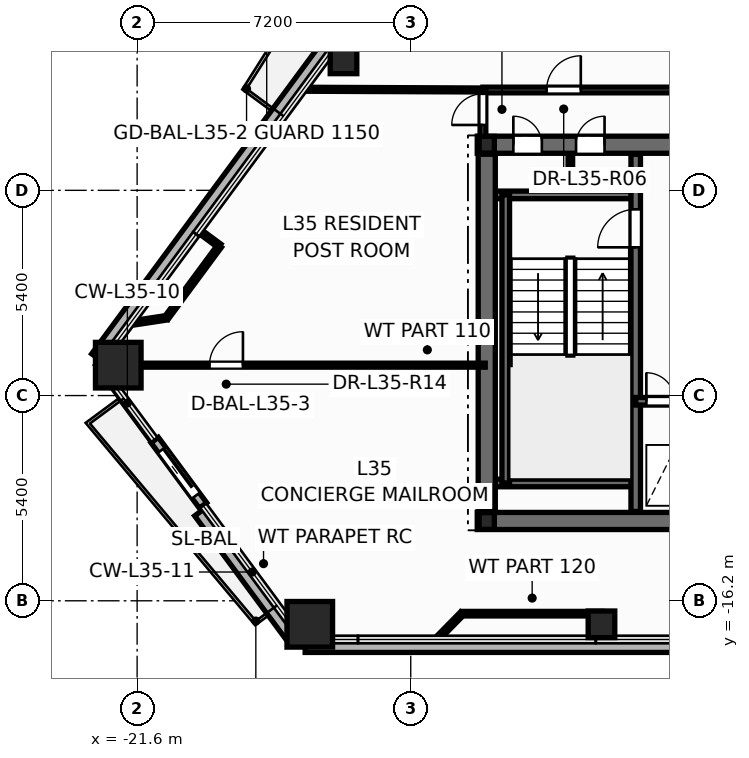
"""IFC4 building model, lengths in metres.
Left out: names, types, materials, properties, quantities, classifications, styles, units other than length and angle.
Written with IfcOpenShell. Run it as: python <this file> out.ifc"""

import sys

from ifc_helpers import new_model, si_unit, direction, frame, frame_2d, origin, origin_2d, place, context, subcontext, project, spatial, rectangle, hollow_rectangle, hollow_circle, i_section, extrude, element, fill, save


model = new_model("IFC4")
c1 = context("Model", 3, precision=1e-05, world=origin(), true_north=direction((0.0, 1.0)))
c2 = subcontext(c1, "Body", "Model", "MODEL_VIEW")
j1 = project(units=[si_unit("LENGTHUNIT", "METRE"), si_unit("PLANEANGLEUNIT", "RADIAN")], contexts=[c1])
p1 = place(None, origin())
s1 = spatial("IfcSite", under=j1, at=p1, CompositionType="ELEMENT")
p2 = place(p1, origin())
s2 = spatial("IfcBuilding", under=s1, at=p2, CompositionType="ELEMENT")
p3 = place(p2, frame((0.0, 0.0, 136.5)))
s3 = spatial("IfcBuildingStorey", under=s2, at=p3, CompositionType="ELEMENT", Elevation=136.5)
for number, where, z_axis, x_axis in (
    (1, (-22.096, -10.0, 0.0), (0.0, 0.0, 1.0), (1.0, 0.0, 0.0)),
    (2, (-17.057, -16.819, 0.0), (0.0, 0.0, 1.0), (1.0, 0.0, 0.0)),
):
    element("IfcColumn", number, at=place(p3, frame(where, z_axis=z_axis, x_axis=x_axis)), inside=s3, PredefinedType="COLUMN", context=c2, shape_type="SweptSolid", body=[
        extrude(hollow_rectangle(XDim=1.2, YDim=1.2, WallThickness=0.055, at=origin_2d()), origin(), (0.0, 0.0, 1.0), 3.6),
    ])
for number, where, z_axis, x_axis in (
    (3, (-9.381, -16.819, 0.0), (0.0, 0.0, 1.0), (1.0, 0.0, 0.0)),
    (4, (-16.169, -1.98, 0.0), (0.0, 0.0, 1.0), (1.0, 0.0, 0.0)),
):
    element("IfcColumn", number, at=place(p3, frame(where, z_axis=z_axis, x_axis=x_axis)), inside=s3, PredefinedType="COLUMN", context=c2, shape_type="SweptSolid", body=[
        extrude(hollow_circle(Radius=0.35, WallThickness=0.03, at=origin_2d()), origin(), (0.0, 0.0, 1.0), 3.6),
    ])
for number, where, z_axis, x_axis in (
    (5, (-12.4, -14.1, 0.0), (0.0, 0.0, 1.0), (1.0, 0.0, 0.0)),
    (6, (-12.4, -4.2, 0.0), (0.0, 0.0, 1.0), (1.0, 0.0, 0.0)),
):
    element("IfcColumn", number, at=place(p3, frame(where, z_axis=z_axis, x_axis=x_axis)), inside=s3, PredefinedType="COLUMN", context=c2, shape_type="SweptSolid", body=[
        extrude(i_section(OverallWidth=0.4, OverallDepth=0.44, WebThickness=0.028, FlangeThickness=0.04, at=origin_2d()), origin(), (0.0, 0.0, 1.0), 3.6),
    ])
p4 = place(p3, frame((-19.941, -13.858, -0.2), z_axis=(0.0, 0.0, 1.0), x_axis=(0.594364765999, -0.804195576299, 0.0)))
e7 = element("IfcWall", 7, at=p4, inside=s3, PredefinedType="PARAPET", context=c2, shape_type="SweptSolid", body=[
    extrude(rectangle(XDim=4.177, YDim=0.36, at=frame_2d((2.088, 0.0))), origin(), (0.0, 0.0, 1.0), 0.38),
])
p5 = place(p3, frame((-17.179, -17.379, -0.2), z_axis=(0.0, 0.0, 1.0), x_axis=(1.0, 0.0, 0.0)))
e8 = element("IfcWall", 8, at=p5, inside=s3, PredefinedType="PARAPET", context=c2, shape_type="SweptSolid", body=[
    extrude(rectangle(XDim=34.357, YDim=0.36, at=frame_2d((17.179, 0.0))), origin(), (0.0, 0.0, 1.0), 0.38),
])
p6 = place(p3, frame((-13.986, 1.915, -0.2), z_axis=(0.0, 0.0, 1.0), x_axis=(-0.594360924603, -0.804198415383, 0.0)))
e9 = element("IfcWall", 9, at=p6, inside=s3, PredefinedType="PARAPET", context=c2, shape_type="SweptSolid", body=[
    extrude(rectangle(XDim=14.578, YDim=0.36, at=frame_2d((7.289, 0.0))), origin(), (0.0, 0.0, 1.0), 0.38),
])
p7 = place(p3, frame((-21.138, -11.97, -0.015), z_axis=(0.0, 0.0, 1.0), x_axis=(0.594381437757, -0.804183254271, 0.0)))
e10 = element("IfcWall", 10, at=p7, inside=s3, PredefinedType="STANDARD", context=c2, shape_type="SweptSolid", body=[
    extrude(rectangle(XDim=2.14, YDim=0.24, at=frame_2d((1.07, 0.0))), origin(), (0.0, 0.0, 1.0), 2.807),
])
p8 = place(p7, frame((0.32, 0.0, 0.015)))
e11 = element("IfcOpeningElement", 11, at=p8, cuts=e10, PredefinedType="OPENING", context=c2, shape_type="SweptSolid", body=[
    extrude(rectangle(XDim=1.506, YDim=2.204, at=frame_2d((0.75, 1.102))), frame((0.0, 0.13, 0.0), z_axis=(0.0, -1.0, 0.0), x_axis=(1.0, 0.0, 0.0)), (0.0, 0.0, 1.0), 0.26),
])
p9 = place(p3, frame((-10.2, -5.52, 0.0), z_axis=(0.0, 0.0, 1.0), x_axis=(0.0, 1.0, 0.0)))
e12 = element("IfcWall", 12, at=p9, inside=s3, PredefinedType="PARTITIONING", context=c2, shape_type="SweptSolid", body=[
    extrude(rectangle(XDim=1.12, YDim=0.12, at=frame_2d((0.56, 0.0))), origin(), (0.0, 0.0, 1.0), 3.35),
])
p10 = place(p3, frame((-12.65, -14.1, 0.0), z_axis=(0.0, 0.0, 1.0), x_axis=(1.0, 0.0, 0.0)))
e13 = element("IfcWall", 13, at=p10, inside=s3, PredefinedType="SHEAR", context=c2, shape_type="SweptSolid", body=[
    extrude(rectangle(XDim=25.3, YDim=0.45, at=frame_2d((12.65, 0.0))), origin(), (0.0, 0.0, 1.0), 3.6),
])
p11 = place(p3, frame((-12.65, -4.2, 0.0), z_axis=(0.0, 0.0, 1.0), x_axis=(1.0, 0.0, 0.0)))
e14 = element("IfcWall", 14, at=p11, inside=s3, PredefinedType="SHEAR", context=c2, shape_type="SweptSolid", body=[
    extrude(rectangle(XDim=25.3, YDim=0.45, at=frame_2d((12.65, 0.0))), origin(), (0.0, 0.0, 1.0), 3.6),
])
p12 = place(p11, frame((0.95, 0.0, 0.0)))
e15 = element("IfcOpeningElement", 15, at=p12, cuts=e14, PredefinedType="OPENING", context=c2, shape_type="SweptSolid", body=[
    extrude(rectangle(XDim=0.756, YDim=2.054, at=frame_2d((0.375, 1.027))), frame((0.0, 0.235, 0.0), z_axis=(0.0, -1.0, 0.0), x_axis=(1.0, 0.0, 0.0)), (0.0, 0.0, 1.0), 0.47),
])
p13 = place(p11, frame((2.6, 0.0, 0.0)))
e16 = element("IfcOpeningElement", 16, at=p13, cuts=e14, PredefinedType="OPENING", context=c2, shape_type="SweptSolid", body=[
    extrude(rectangle(XDim=0.756, YDim=2.054, at=frame_2d((0.375, 1.027))), frame((0.0, 0.235, 0.0), z_axis=(0.0, -1.0, 0.0), x_axis=(1.0, 0.0, 0.0)), (0.0, 0.0, 1.0), 0.47),
])
p14 = place(p11, frame((21.85, 0.0, 0.0)))
e17 = element("IfcOpeningElement", 17, at=p14, cuts=e14, PredefinedType="OPENING", context=c2, shape_type="SweptSolid", body=[
    extrude(rectangle(XDim=0.756, YDim=2.054, at=frame_2d((0.375, 1.027))), frame((0.0, 0.235, 0.0), z_axis=(0.0, -1.0, 0.0), x_axis=(1.0, 0.0, 0.0)), (0.0, 0.0, 1.0), 0.47),
])
p15 = place(p11, frame((23.5, 0.0, 0.0)))
e18 = element("IfcOpeningElement", 18, at=p15, cuts=e14, PredefinedType="OPENING", context=c2, shape_type="SweptSolid", body=[
    extrude(rectangle(XDim=0.756, YDim=2.054, at=frame_2d((0.375, 1.027))), frame((0.0, 0.235, 0.0), z_axis=(0.0, -1.0, 0.0), x_axis=(1.0, 0.0, 0.0)), (0.0, 0.0, 1.0), 0.47),
])
p16 = place(p11, frame((5.85, 0.0, 0.0)))
e19 = element("IfcOpeningElement", 19, at=p16, cuts=e14, PredefinedType="OPENING", context=c2, shape_type="SweptSolid", body=[
    extrude(rectangle(XDim=1.006, YDim=2.104, at=frame_2d((0.5, 1.052))), frame((0.0, 0.235, 0.0), z_axis=(0.0, -1.0, 0.0), x_axis=(1.0, 0.0, 0.0)), (0.0, 0.0, 1.0), 0.47),
])
p17 = place(p11, frame((10.35, 0.0, 0.0)))
e20 = element("IfcOpeningElement", 20, at=p17, cuts=e14, PredefinedType="OPENING", context=c2, shape_type="SweptSolid", body=[
    extrude(rectangle(XDim=1.406, YDim=2.154, at=frame_2d((0.7, 1.077))), frame((0.0, 0.235, 0.0), z_axis=(0.0, -1.0, 0.0), x_axis=(1.0, 0.0, 0.0)), (0.0, 0.0, 1.0), 0.47),
])
p18 = place(p11, frame((18.45, 0.0, 0.0)))
e21 = element("IfcOpeningElement", 21, at=p18, cuts=e14, PredefinedType="OPENING", context=c2, shape_type="SweptSolid", body=[
    extrude(rectangle(XDim=1.006, YDim=2.104, at=frame_2d((0.5, 1.052))), frame((0.0, 0.235, 0.0), z_axis=(0.0, -1.0, 0.0), x_axis=(1.0, 0.0, 0.0)), (0.0, 0.0, 1.0), 0.47),
])
for number, where, z_axis, x_axis in (
    (22, (-12.35, -5.52, 0.0), (0.0, 0.0, 1.0), (1.0, 0.0, 0.0)),
    (23, (-12.35, -13.1, 0.0), (0.0, 0.0, 1.0), (1.0, 0.0, 0.0)),
):
    element("IfcWall", number, at=place(p3, frame(where, z_axis=z_axis, x_axis=x_axis)), inside=s3, PredefinedType="SOLIDWALL", context=c2, shape_type="SweptSolid", body=[
        extrude(rectangle(XDim=3.87, YDim=0.2, at=frame_2d((1.935, 0.0))), origin(), (0.0, 0.0, 1.0), 3.6),
    ])
p19 = place(p3, frame((-11.9, -13.1, 0.0), z_axis=(0.0, 0.0, 1.0), x_axis=(0.0, 1.0, 0.0)))
e24 = element("IfcWall", 24, at=p19, inside=s3, PredefinedType="SOLIDWALL", context=c2, shape_type="SweptSolid", body=[
    extrude(rectangle(XDim=7.58, YDim=0.2, at=frame_2d((3.79, 0.0))), origin(), (0.0, 0.0, 1.0), 3.6),
])
p20 = place(p3, frame((-8.48, -13.85, 0.0), z_axis=(0.0, 0.0, 1.0), x_axis=(0.0, 1.0, 0.0)))
e25 = element("IfcWall", 25, at=p20, inside=s3, PredefinedType="SHEAR", context=c2, shape_type="SweptSolid", body=[
    extrude(rectangle(XDim=9.4, YDim=0.25, at=frame_2d((4.7, 0.0))), origin(), (0.0, 0.0, 1.0), 3.6),
])
p21 = place(p20, frame((6.95, 0.0, 0.0)))
e26 = element("IfcOpeningElement", 26, at=p21, cuts=e25, PredefinedType="OPENING", context=c2, shape_type="SweptSolid", body=[
    extrude(rectangle(XDim=1.006, YDim=2.104, at=frame_2d((0.5, 1.052))), frame((0.0, 0.135, 0.0), z_axis=(0.0, -1.0, 0.0), x_axis=(1.0, 0.0, 0.0)), (0.0, 0.0, 1.0), 0.27),
])
p22 = place(p3, frame((-8.48, -10.95, 0.0), z_axis=(0.0, 0.0, 1.0), x_axis=(1.0, 0.0, 0.0)))
e27 = element("IfcWall", 27, at=p22, inside=s3, PredefinedType="SOLIDWALL", context=c2, shape_type="SweptSolid", body=[
    extrude(rectangle(XDim=3.36, YDim=0.2, at=frame_2d((1.68, 0.0))), origin(), (0.0, 0.0, 1.0), 3.6),
])
p23 = place(p22, frame((0.28, 0.0, 0.0)))
e28 = element("IfcOpeningElement", 28, at=p23, cuts=e27, PredefinedType="OPENING", context=c2, shape_type="SweptSolid", body=[
    extrude(rectangle(XDim=0.756, YDim=2.054, at=frame_2d((0.375, 1.027))), frame((0.0, 0.11, 0.0), z_axis=(0.0, -1.0, 0.0), x_axis=(1.0, 0.0, 0.0)), (0.0, 0.0, 1.0), 0.22),
])
p24 = place(p22, frame((1.85, 0.0, 0.0)))
e29 = element("IfcOpeningElement", 29, at=p24, cuts=e27, PredefinedType="OPENING", context=c2, shape_type="SweptSolid", body=[
    extrude(rectangle(XDim=1.106, YDim=2.104, at=frame_2d((0.55, 1.052))), frame((0.0, 0.11, 0.0), z_axis=(0.0, -1.0, 0.0), x_axis=(1.0, 0.0, 0.0)), (0.0, 0.0, 1.0), 0.22),
])
p25 = place(p3, frame((-12.4, -13.85, 0.0), z_axis=(0.0, 0.0, 1.0), x_axis=(0.0, 1.0, 0.0)))
e30 = element("IfcWall", 30, at=p25, inside=s3, PredefinedType="SHEAR", context=c2, shape_type="SweptSolid", body=[
    extrude(rectangle(XDim=9.4, YDim=0.45, at=frame_2d((4.7, 0.0))), origin(), (0.0, 0.0, 1.0), 3.6),
])
p26 = place(p3, frame((-12.5, -2.76, 0.0), z_axis=(0.0, 0.0, 1.0), x_axis=(1.0, 0.0, 0.0)))
e31 = element("IfcWall", 31, at=p26, inside=s3, PredefinedType="PARTITIONING", context=c2, shape_type="SweptSolid", body=[
    extrude(rectangle(XDim=13.14, YDim=0.15, at=frame_2d((6.57, 0.0))), origin(), (0.0, 0.0, 1.0), 2.325),
])
p27 = place(p26, frame((1.675, 0.0, 0.0)))
e32 = element("IfcOpeningElement", 32, at=p27, cuts=e31, PredefinedType="OPENING", context=c2, shape_type="SweptSolid", body=[
    extrude(rectangle(XDim=0.906, YDim=2.104, at=frame_2d((0.45, 1.052))), frame((0.0, 0.085, 0.0), z_axis=(0.0, -1.0, 0.0), x_axis=(1.0, 0.0, 0.0)), (0.0, 0.0, 1.0), 0.17),
])
p28 = place(p3, frame((-22.594, -10.0, 0.0), z_axis=(0.0, 0.0, 1.0), x_axis=(1.0, 0.0, 0.0)))
e33 = element("IfcWall", 33, at=p28, inside=s3, PredefinedType="PARTITIONING", context=c2, shape_type="SweptSolid", body=[
    extrude(rectangle(XDim=10.154, YDim=0.105, at=frame_2d((5.077, 0.0))), origin(), (0.0, 0.0, 1.0), 2.325),
])
p29 = place(p28, frame((2.898, 0.0, 0.0)))
e34 = element("IfcOpeningElement", 34, at=p29, cuts=e33, PredefinedType="OPENING", context=c2, shape_type="SweptSolid", body=[
    extrude(rectangle(XDim=0.886, YDim=2.104, at=frame_2d((0.44, 1.052))), frame((0.0, 0.062, 0.0), z_axis=(0.0, -1.0, 0.0), x_axis=(1.0, 0.0, 0.0)), (0.0, 0.0, 1.0), 0.125),
])
p30 = place(p3, frame((-17.228, -2.74, 0.0), z_axis=(0.0, 0.0, 1.0), x_axis=(0.999991471145, -0.004130089188, 0.0)))
e35 = element("IfcWall", 35, at=p30, inside=s3, PredefinedType="PARTITIONING", context=c2, shape_type="SweptSolid", body=[
    extrude(rectangle(XDim=4.788, YDim=0.105, at=frame_2d((2.394, 0.0))), origin(), (0.0, 0.0, 1.0), 2.792),
])
p31 = place(p3, frame((-13.052, -16.539, 0.0), z_axis=(0.0, 0.0, 1.0), x_axis=(1.0, 0.0, 0.0)))
e36 = element("IfcWall", 36, at=p31, inside=s3, PredefinedType="PARTITIONING", context=c2, shape_type="SweptSolid", body=[
    extrude(rectangle(XDim=3.693, YDim=0.12, at=frame_2d((1.847, 0.0))), origin(), (0.0, 0.0, 1.0), 2.792),
])
p32 = place(p3, frame((-19.43, -6.864, 0.0), z_axis=(0.0, 0.0, 1.0), x_axis=(-0.594335579712, -0.804217146477, 0.0)))
e37 = element("IfcWall", 37, at=p32, inside=s3, PredefinedType="PARTITIONING", context=c2, shape_type="SweptSolid", body=[
    extrude(rectangle(XDim=2.351, YDim=0.12, at=frame_2d((1.175, 0.0))), origin(), (0.0, 0.0, 1.0), 3.35),
])
p33 = place(p3, frame((-12.5, -4.24, 0.0), z_axis=(0.0, 0.0, 1.0), x_axis=(0.0, 1.0, 0.0)))
e38 = element("IfcWall", 38, at=p33, inside=s3, PredefinedType="PARTITIONING", context=c2, shape_type="SweptSolid", body=[
    extrude(rectangle(XDim=1.48, YDim=0.15, at=frame_2d((0.74, 0.0))), origin(), (0.0, 0.0, 1.0), 2.325),
])
p34 = place(p33, frame((0.56, 0.0, 0.0)))
e39 = element("IfcOpeningElement", 39, at=p34, cuts=e38, PredefinedType="OPENING", context=c2, shape_type="SweptSolid", body=[
    extrude(rectangle(XDim=0.826, YDim=2.104, at=frame_2d((0.41, 1.052))), frame((0.0, 0.085, 0.0), z_axis=(0.0, -1.0, 0.0), x_axis=(1.0, 0.0, 0.0)), (0.0, 0.0, 1.0), 0.17),
])
for number, where, z_axis, x_axis in (
    (40, (-20.827, -8.754, 0.0), (0.0, 0.0, 1.0), (-0.989, -0.15, 0.0)),
    (41, (-13.647, -17.144, 0.0), (0.0, 0.0, 1.0), (0.701, 0.713, 0.0)),
):
    element("IfcWall", number, at=place(p3, frame(where, z_axis=z_axis, x_axis=x_axis)), inside=s3, PredefinedType="PARTITIONING", context=c2, shape_type="SweptSolid", body=[
        extrude(rectangle(XDim=0.849, YDim=0.12, at=frame_2d((0.425, 0.0))), origin(), (0.0, 0.0, 1.0), 2.792),
    ])
p35 = place(p3, frame((-19.969, -6.465, 0.0), z_axis=(0.0, 0.0, 1.0), x_axis=(0.804221577226, -0.594329584257, 0.0)))
e42 = element("IfcWall", 42, at=p35, inside=s3, PredefinedType="PARTITIONING", context=c2, shape_type="SweptSolid", body=[
    extrude(rectangle(XDim=0.67, YDim=0.12, at=frame_2d((0.335, 0.0))), origin(), (0.0, 0.0, 1.0), 2.792),
])
p36 = place(p3, frame((-9.358, -16.539, 0.0), z_axis=(0.0, 0.0, 1.0), x_axis=(0.0, -1.0, 0.0)))
e43 = element("IfcWall", 43, at=p36, inside=s3, PredefinedType="PARTITIONING", context=c2, shape_type="SweptSolid", body=[
    extrude(rectangle(XDim=0.67, YDim=0.12, at=frame_2d((0.335, 0.0))), origin(), (0.0, 0.0, 1.0), 2.792),
])
p37 = place(p8, origin())
e44 = element("IfcDoor", 44, at=p37, inside=s3, OperationType="SLIDING_TO_RIGHT", PredefinedType="DOOR", context=c2, shape_type="SweptSolid", body=[
    extrude(rectangle(XDim=1.5, YDim=2.2, at=frame_2d((0.75, 1.1))), frame((0.0, 0.025, 0.0), z_axis=(0.0, -1.0, 0.0), x_axis=(1.0, 0.0, 0.0)), (0.0, 0.0, 1.0), 0.05),
])
fill(e11, e44)
p38 = place(p21, origin())
e45 = element("IfcDoor", 45, at=p38, inside=s3, OperationType="SINGLE_SWING_LEFT", PredefinedType="DOOR", context=c2, shape_type="SweptSolid", body=[
    extrude(rectangle(XDim=1.0, YDim=2.1, at=frame_2d((0.5, 1.05))), frame((0.0, 0.025, 0.0), z_axis=(0.0, -1.0, 0.0), x_axis=(1.0, 0.0, 0.0)), (0.0, 0.0, 1.0), 0.05),
])
fill(e26, e45)
p39 = place(p23, origin())
e46 = element("IfcDoor", 46, at=p39, inside=s3, OperationType="SINGLE_SWING_LEFT", PredefinedType="DOOR", context=c2, shape_type="SweptSolid", body=[
    extrude(rectangle(XDim=0.75, YDim=2.05, at=frame_2d((0.375, 1.025))), frame((0.0, 0.025, 0.0), z_axis=(0.0, -1.0, 0.0), x_axis=(1.0, 0.0, 0.0)), (0.0, 0.0, 1.0), 0.05),
])
fill(e28, e46)
p40 = place(p12, origin())
e47 = element("IfcDoor", 47, at=p40, inside=s3, OperationType="SINGLE_SWING_LEFT", PredefinedType="DOOR", context=c2, shape_type="SweptSolid", body=[
    extrude(rectangle(XDim=0.75, YDim=2.05, at=frame_2d((0.375, 1.025))), frame((0.0, 0.025, 0.0), z_axis=(0.0, -1.0, 0.0), x_axis=(1.0, 0.0, 0.0)), (0.0, 0.0, 1.0), 0.05),
])
fill(e15, e47)
p41 = place(p13, origin())
e48 = element("IfcDoor", 48, at=p41, inside=s3, OperationType="SINGLE_SWING_RIGHT", PredefinedType="DOOR", context=c2, shape_type="SweptSolid", body=[
    extrude(rectangle(XDim=0.75, YDim=2.05, at=frame_2d((0.375, 1.025))), frame((0.0, 0.025, 0.0), z_axis=(0.0, -1.0, 0.0), x_axis=(1.0, 0.0, 0.0)), (0.0, 0.0, 1.0), 0.05),
])
fill(e16, e48)
p42 = place(p27, origin())
e49 = element("IfcDoor", 49, at=p42, inside=s3, OperationType="SINGLE_SWING_RIGHT", PredefinedType="DOOR", context=c2, shape_type="SweptSolid", body=[
    extrude(rectangle(XDim=0.9, YDim=2.1, at=frame_2d((0.45, 1.05))), frame((0.0, 0.025, 0.0), z_axis=(0.0, -1.0, 0.0), x_axis=(1.0, 0.0, 0.0)), (0.0, 0.0, 1.0), 0.05),
])
fill(e32, e49)
p43 = place(p29, origin())
e50 = element("IfcDoor", 50, at=p43, inside=s3, OperationType="SINGLE_SWING_RIGHT", PredefinedType="DOOR", context=c2, shape_type="SweptSolid", body=[
    extrude(rectangle(XDim=0.88, YDim=2.1, at=frame_2d((0.44, 1.05))), frame((0.0, 0.025, 0.0), z_axis=(0.0, -1.0, 0.0), x_axis=(1.0, 0.0, 0.0)), (0.0, 0.0, 1.0), 0.05),
])
fill(e34, e50)
p44 = place(p34, origin())
e51 = element("IfcDoor", 51, at=p44, inside=s3, OperationType="SINGLE_SWING_LEFT", PredefinedType="DOOR", context=c2, shape_type="SweptSolid", body=[
    extrude(rectangle(XDim=0.82, YDim=2.1, at=frame_2d((0.41, 1.05))), frame((0.0, 0.025, 0.0), z_axis=(0.0, -1.0, 0.0), x_axis=(1.0, 0.0, 0.0)), (0.0, 0.0, 1.0), 0.05),
])
fill(e39, e51)
save(model, sys.argv[1])
